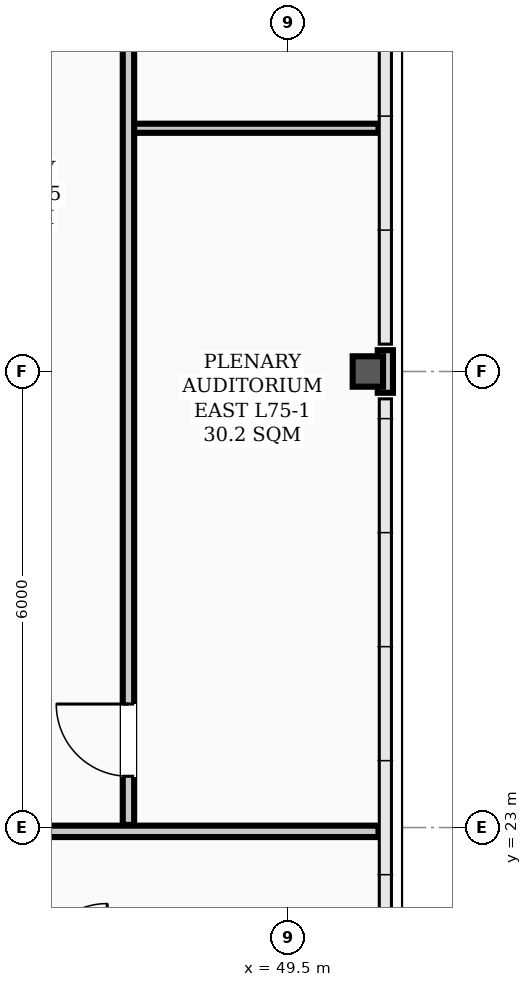
"""IFC4 building model, lengths in metres.
Left out: names, types, materials, properties, quantities, classifications, styles, units other than length and angle.
Written with IfcOpenShell. Run it as: python <this file> out.ifc"""

import sys

from ifc_helpers import new_model, si_unit, direction, frame, frame_2d, origin, origin_2d, place, context, subcontext, project, spatial, rectangle, hollow_rectangle, extrude, element, fill, save


model = new_model("IFC4")
c1 = context("Model", 3, precision=1e-05, world=origin(), true_north=direction((0.0, 1.0)))
c2 = subcontext(c1, "Body", "Model", "MODEL_VIEW")
j1 = project(units=[si_unit("LENGTHUNIT", "METRE"), si_unit("PLANEANGLEUNIT", "RADIAN")], contexts=[c1])
p1 = place(None, origin())
s1 = spatial("IfcSite", under=j1, at=p1, CompositionType="ELEMENT")
p2 = place(p1, origin())
s2 = spatial("IfcBuilding", under=s1, at=p2, CompositionType="ELEMENT")
p3 = place(p2, frame((0.0, 0.0, 300.8)))
s3 = spatial("IfcBuildingStorey", under=s2, at=p3, CompositionType="ELEMENT", Elevation=300.8)
p4 = place(p3, frame((50.55, 29.0, 0.0), z_axis=(0.0, 0.0, 1.0), x_axis=(1.0, 0.0, 0.0)))
e1 = element("IfcColumn", 1, at=p4, inside=s3, PredefinedType="COLUMN", context=c2, shape_type="SweptSolid", body=[
    extrude(hollow_rectangle(XDim=0.4, YDim=0.4, WallThickness=0.02, InnerFilletRadius=0.02, OuterFilletRadius=0.04, at=origin_2d()), origin(), (0.0, 0.0, 1.0), 5.2),
])
p5 = place(p3, frame((50.78, 28.72, 0.0), z_axis=(0.0, 0.0, 1.0), x_axis=(0.0, 1.0, 0.0)))
e2 = element("IfcWall", 2, at=p5, inside=s3, PredefinedType="PARAPET", context=c2, shape_type="SweptSolid", body=[
    extrude(rectangle(XDim=0.56, YDim=0.2, at=frame_2d((0.28, 0.0))), origin(), (0.0, 0.0, 1.0), 1.2),
])
p6 = place(p3, frame((12.31, 22.95, 0.0), z_axis=(0.0, 0.0, 1.0), x_axis=(1.0, 0.0, 0.0)))
e3 = element("IfcWall", 3, at=p6, inside=s3, PredefinedType="PARTITIONING", context=c2, shape_type="SweptSolid", body=[
    extrude(rectangle(XDim=38.38, YDim=0.15, at=frame_2d((19.19, 0.0))), origin(), (0.0, 0.0, 1.0), 3.48),
])
p7 = place(p6, frame((3.47, 0.0, 0.0)))
e4 = element("IfcOpeningElement", 4, at=p7, cuts=e3, PredefinedType="OPENING", context=c2, shape_type="SweptSolid", body=[
    extrude(rectangle(XDim=0.95, YDim=2.08, at=frame_2d((0.475, 1.04))), frame((0.0, 0.085, 0.0), z_axis=(0.0, -1.0, 0.0), x_axis=(1.0, 0.0, 0.0)), (0.0, 0.0, 1.0), 0.17),
])
p8 = place(p6, frame((9.615, 0.0, 0.0)))
e5 = element("IfcOpeningElement", 5, at=p8, cuts=e3, PredefinedType="OPENING", context=c2, shape_type="SweptSolid", body=[
    extrude(rectangle(XDim=0.95, YDim=2.08, at=frame_2d((0.475, 1.04))), frame((0.0, 0.085, 0.0), z_axis=(0.0, -1.0, 0.0), x_axis=(1.0, 0.0, 0.0)), (0.0, 0.0, 1.0), 0.17),
])
p9 = place(p6, frame((15.415, 0.0, 0.0)))
e6 = element("IfcOpeningElement", 6, at=p9, cuts=e3, PredefinedType="OPENING", context=c2, shape_type="SweptSolid", body=[
    extrude(rectangle(XDim=0.95, YDim=2.08, at=frame_2d((0.475, 1.04))), frame((0.0, 0.085, 0.0), z_axis=(0.0, -1.0, 0.0), x_axis=(1.0, 0.0, 0.0)), (0.0, 0.0, 1.0), 0.17),
])
p10 = place(p6, frame((22.015, 0.0, 0.0)))
e7 = element("IfcOpeningElement", 7, at=p10, cuts=e3, PredefinedType="OPENING", context=c2, shape_type="SweptSolid", body=[
    extrude(rectangle(XDim=0.95, YDim=2.08, at=frame_2d((0.475, 1.04))), frame((0.0, 0.085, 0.0), z_axis=(0.0, -1.0, 0.0), x_axis=(1.0, 0.0, 0.0)), (0.0, 0.0, 1.0), 0.17),
])
p11 = place(p6, frame((27.415, 0.0, 0.0)))
e8 = element("IfcOpeningElement", 8, at=p11, cuts=e3, PredefinedType="OPENING", context=c2, shape_type="SweptSolid", body=[
    extrude(rectangle(XDim=0.95, YDim=2.08, at=frame_2d((0.475, 1.04))), frame((0.0, 0.085, 0.0), z_axis=(0.0, -1.0, 0.0), x_axis=(1.0, 0.0, 0.0)), (0.0, 0.0, 1.0), 0.17),
])
p12 = place(p6, frame((33.115, 0.0, 0.0)))
e9 = element("IfcOpeningElement", 9, at=p12, cuts=e3, PredefinedType="OPENING", context=c2, shape_type="SweptSolid", body=[
    extrude(rectangle(XDim=0.95, YDim=2.08, at=frame_2d((0.475, 1.04))), frame((0.0, 0.085, 0.0), z_axis=(0.0, -1.0, 0.0), x_axis=(1.0, 0.0, 0.0)), (0.0, 0.0, 1.0), 0.17),
])
p13 = place(p3, frame((47.4, 32.2, 0.0), z_axis=(0.0, 0.0, 1.0), x_axis=(1.0, 0.0, 0.0)))
e10 = element("IfcWall", 10, at=p13, inside=s3, PredefinedType="PARTITIONING", context=c2, shape_type="SweptSolid", body=[
    extrude(rectangle(XDim=3.29, YDim=0.12, at=frame_2d((1.645, 0.0))), origin(), (0.0, 0.0, 1.0), 3.48),
])
p14 = place(p3, frame((47.4, 23.035, 0.0), z_axis=(0.0, 0.0, 1.0), x_axis=(0.0, 1.0, 0.0)))
e11 = element("IfcWall", 11, at=p14, inside=s3, PredefinedType="PARTITIONING", context=c2, shape_type="SweptSolid", body=[
    extrude(rectangle(XDim=18.63, YDim=0.15, at=frame_2d((9.315, 0.0))), origin(), (0.0, 0.0, 1.0), 3.48),
])
p15 = place(p14, frame((0.64, 0.0, 0.0)))
e12 = element("IfcOpeningElement", 12, at=p15, cuts=e11, PredefinedType="OPENING", context=c2, shape_type="SweptSolid", body=[
    extrude(rectangle(XDim=0.95, YDim=2.08, at=frame_2d((0.475, 1.04))), frame((0.0, 0.085, 0.0), z_axis=(0.0, -1.0, 0.0), x_axis=(1.0, 0.0, 0.0)), (0.0, 0.0, 1.0), 0.17),
])
p16 = place(p14, frame((10.59, 0.0, 0.0)))
e13 = element("IfcOpeningElement", 13, at=p16, cuts=e11, PredefinedType="OPENING", context=c2, shape_type="SweptSolid", body=[
    extrude(rectangle(XDim=0.95, YDim=2.08, at=frame_2d((0.475, 1.04))), frame((0.0, 0.085, 0.0), z_axis=(0.0, -1.0, 0.0), x_axis=(1.0, 0.0, 0.0)), (0.0, 0.0, 1.0), 0.17),
])
p17 = place(p14, frame((15.365, 0.0, 0.0)))
e14 = element("IfcOpeningElement", 14, at=p17, cuts=e11, PredefinedType="OPENING", context=c2, shape_type="SweptSolid", body=[
    extrude(rectangle(XDim=0.95, YDim=2.08, at=frame_2d((0.475, 1.04))), frame((0.0, 0.085, 0.0), z_axis=(0.0, -1.0, 0.0), x_axis=(1.0, 0.0, 0.0)), (0.0, 0.0, 1.0), 0.17),
])
p18 = place(p15, origin())
e15 = element("IfcDoor", 15, at=p18, inside=s3, OperationType="SINGLE_SWING_RIGHT", PredefinedType="DOOR", context=c2, shape_type="SweptSolid", body=[
    extrude(rectangle(XDim=0.95, YDim=2.08, at=frame_2d((0.475, 1.04))), frame((0.0, 0.025, 0.0), z_axis=(0.0, -1.0, 0.0), x_axis=(1.0, 0.0, 0.0)), (0.0, 0.0, 1.0), 0.05),
])
fill(e12, e15)
save(model, sys.argv[1])
